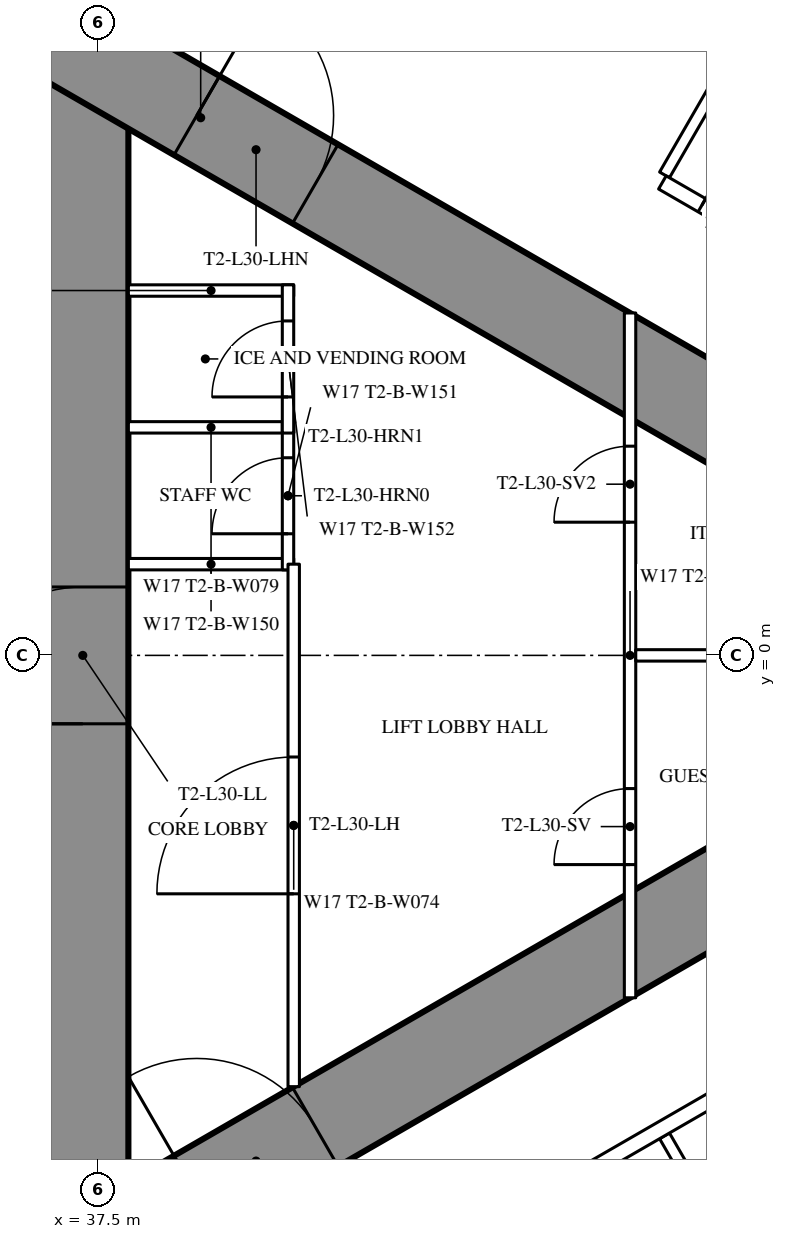
"""IFC4 building model, lengths in metres.
Left out: names, types, materials, properties, quantities, classifications, styles, units other than length and angle.
Written with IfcOpenShell. Run it as: python <this file> out.ifc"""

import sys

from ifc_helpers import new_model, si_unit, direction, frame, frame_2d, origin, place, context, subcontext, project, spatial, rectangle, extrude, element, fill, save


model = new_model("IFC4")
c1 = context("Model", 3, precision=1e-05, world=origin(), true_north=direction((0.0, 1.0)))
c2 = subcontext(c1, "Body", "Model", "MODEL_VIEW")
j1 = project(units=[si_unit("LENGTHUNIT", "METRE"), si_unit("PLANEANGLEUNIT", "RADIAN")], contexts=[c1])
p1 = place(None, origin())
s1 = spatial("IfcSite", under=j1, at=p1, CompositionType="ELEMENT")
p2 = place(p1, origin())
s2 = spatial("IfcBuilding", under=s1, at=p2, CompositionType="ELEMENT")
p3 = place(p2, frame((0.0, 0.0, 115.1)))
s3 = spatial("IfcBuildingStorey", under=s2, at=p3, CompositionType="ELEMENT", Elevation=115.1)
p4 = place(p3, frame((37.3, -8.6, 0.0), z_axis=(0.0, 0.0, 1.0), x_axis=(0.0, 1.0, 0.0)))
e1 = element("IfcWall", 1, at=p4, inside=s3, PredefinedType="SHEAR", context=c2, shape_type="SweptSolid", body=[
    extrude(rectangle(XDim=17.2, YDim=1.2, at=frame_2d((8.6, 0.0))), origin(), (0.0, 0.0, 1.0), 3.5),
])
p5 = place(p4, frame((7.7, 0.0, 0.0)))
e2 = element("IfcOpeningElement", 2, at=p5, cuts=e1, PredefinedType="OPENING", context=c2, shape_type="SweptSolid", body=[
    extrude(rectangle(XDim=1.8, YDim=2.2, at=frame_2d((0.9, 1.1))), frame((0.0, 0.61, 0.0), z_axis=(0.0, -1.0, 0.0), x_axis=(1.0, 0.0, 0.0)), (0.0, 0.0, 1.0), 1.22),
])
p6 = place(p3, frame((27.2, -13.8, 0.0), z_axis=(0.0, 0.0, 1.0), x_axis=(0.866027159892, 0.499996958321, 0.0)))
e3 = element("IfcWall", 3, at=p6, inside=s3, PredefinedType="SHEAR", context=c2, shape_type="SweptSolid", body=[
    extrude(rectangle(XDim=27.947, YDim=1.2, at=frame_2d((13.973, 0.0))), origin(), (0.0, 0.0, 1.0), 3.5),
])
p7 = place(p6, frame((4.6, 0.0, 0.0)))
e4 = element("IfcOpeningElement", 4, at=p7, cuts=e3, PredefinedType="OPENING", context=c2, shape_type="SweptSolid", body=[
    extrude(rectangle(XDim=1.0, YDim=2.2, at=frame_2d((0.5, 1.1))), frame((0.0, 0.61, 0.0), z_axis=(0.0, -1.0, 0.0), x_axis=(1.0, 0.0, 0.0)), (0.0, 0.0, 1.0), 1.22),
])
p8 = place(p6, frame((13.395, 0.0, 0.0)))
e5 = element("IfcOpeningElement", 5, at=p8, cuts=e3, PredefinedType="OPENING", context=c2, shape_type="SweptSolid", body=[
    extrude(rectangle(XDim=1.8, YDim=2.2, at=frame_2d((0.9, 1.1))), frame((0.0, 0.61, 0.0), z_axis=(0.0, -1.0, 0.0), x_axis=(1.0, 0.0, 0.0)), (0.0, 0.0, 1.0), 1.22),
])
p9 = place(p3, frame((27.2, 13.8, 0.0), z_axis=(0.0, 0.0, 1.0), x_axis=(0.866024515034, -0.500001539357, 0.0)))
e6 = element("IfcWall", 6, at=p9, inside=s3, PredefinedType="SHEAR", context=c2, shape_type="SweptSolid", body=[
    extrude(rectangle(XDim=26.907, YDim=1.2, at=frame_2d((13.454, 0.0))), origin(), (0.0, 0.0, 1.0), 3.5),
])
p10 = place(p9, frame((4.6, 0.0, 0.0)))
e7 = element("IfcOpeningElement", 7, at=p10, cuts=e6, PredefinedType="OPENING", context=c2, shape_type="SweptSolid", body=[
    extrude(rectangle(XDim=1.0, YDim=2.2, at=frame_2d((0.5, 1.1))), frame((0.0, 0.61, 0.0), z_axis=(0.0, -1.0, 0.0), x_axis=(1.0, 0.0, 0.0)), (0.0, 0.0, 1.0), 1.22),
])
p11 = place(p9, frame((13.395, 0.0, 0.0)))
e8 = element("IfcOpeningElement", 8, at=p11, cuts=e6, PredefinedType="OPENING", context=c2, shape_type="SweptSolid", body=[
    extrude(rectangle(XDim=1.8, YDim=2.2, at=frame_2d((0.9, 1.1))), frame((0.0, 0.61, 0.0), z_axis=(0.0, -1.0, 0.0), x_axis=(1.0, 0.0, 0.0)), (0.0, 0.0, 1.0), 1.22),
])
p12 = place(p3, frame((44.954, -6.321, 0.0), z_axis=(0.0, 0.0, 1.0), x_axis=(0.500018676722, -0.866014620505, 0.0)))
e9 = element("IfcWall", 9, at=p12, inside=s3, PredefinedType="PARTITIONING", context=c2, shape_type="SweptSolid", body=[
    extrude(rectangle(XDim=8.704, YDim=0.15, at=frame_2d((4.352, 0.0))), origin(), (0.0, 0.0, 1.0), 2.2),
])
p13 = place(p3, frame((44.954, 6.321, 0.0), z_axis=(0.0, 0.0, 1.0), x_axis=(0.500009815811, 0.866019736549, 0.0)))
e10 = element("IfcWall", 10, at=p13, inside=s3, PredefinedType="PARTITIONING", context=c2, shape_type="SweptSolid", body=[
    extrude(rectangle(XDim=11.424, YDim=0.15, at=frame_2d((5.712, 0.0))), origin(), (0.0, 0.0, 1.0), 3.25),
])
p14 = place(p3, frame((37.96, -10.243, 0.0), z_axis=(0.0, 0.0, 1.0), x_axis=(0.866026429433, 0.499998223521, 0.0)))
e11 = element("IfcWall", 11, at=p14, inside=s3, PredefinedType="PARTITIONING", context=c2, shape_type="SweptSolid", body=[
    extrude(rectangle(XDim=20.487, YDim=0.2, at=frame_2d((10.243, 0.0))), origin(), (0.0, 0.0, 1.0), 3.25),
])
p15 = place(p14, frame((4.343, 0.0, 0.0)))
e12 = element("IfcOpeningElement", 12, at=p15, cuts=e11, PredefinedType="OPENING", context=c2, shape_type="SweptSolid", body=[
    extrude(rectangle(XDim=0.95, YDim=2.2, at=frame_2d((0.475, 1.1))), frame((0.0, 0.11, 0.0), z_axis=(0.0, -1.0, 0.0), x_axis=(1.0, 0.0, 0.0)), (0.0, 0.0, 1.0), 0.22),
])
p16 = place(p14, frame((15.385, 0.0, 0.0)))
e13 = element("IfcOpeningElement", 13, at=p16, cuts=e11, PredefinedType="OPENING", context=c2, shape_type="SweptSolid", body=[
    extrude(rectangle(XDim=0.95, YDim=2.2, at=frame_2d((0.475, 1.1))), frame((0.0, 0.11, 0.0), z_axis=(0.0, -1.0, 0.0), x_axis=(1.0, 0.0, 0.0)), (0.0, 0.0, 1.0), 0.22),
])
p17 = place(p14, frame((17.085, 0.0, 0.0)))
e14 = element("IfcOpeningElement", 14, at=p17, cuts=e11, PredefinedType="OPENING", context=c2, shape_type="SweptSolid", body=[
    extrude(rectangle(XDim=0.95, YDim=2.2, at=frame_2d((0.475, 1.1))), frame((0.0, 0.11, 0.0), z_axis=(0.0, -1.0, 0.0), x_axis=(1.0, 0.0, 0.0)), (0.0, 0.0, 1.0), 0.22),
])
p18 = place(p14, frame((1.048, 0.0, 0.0)))
e15 = element("IfcOpeningElement", 15, at=p18, cuts=e11, PredefinedType="OPENING", context=c2, shape_type="SweptSolid", body=[
    extrude(rectangle(XDim=1.8, YDim=2.2, at=frame_2d((0.9, 1.1))), frame((0.0, 0.11, 0.0), z_axis=(0.0, -1.0, 0.0), x_axis=(1.0, 0.0, 0.0)), (0.0, 0.0, 1.0), 0.22),
])
p19 = place(p3, frame((44.925, 6.222, 0.0), z_axis=(0.0, 0.0, 1.0), x_axis=(0.866025590081, -0.499999677325, 0.0)))
e16 = element("IfcWall", 16, at=p19, inside=s3, PredefinedType="PARTITIONING", context=c2, shape_type="SweptSolid", body=[
    extrude(rectangle(XDim=12.324, YDim=0.2, at=frame_2d((6.162, 0.0))), origin(), (0.0, 0.0, 1.0), 3.25),
])
p20 = place(p19, frame((9.042, 0.0, 0.0)))
e17 = element("IfcOpeningElement", 17, at=p20, cuts=e16, PredefinedType="OPENING", context=c2, shape_type="SweptSolid", body=[
    extrude(rectangle(XDim=0.95, YDim=2.2, at=frame_2d((0.475, 1.1))), frame((0.0, 0.11, 0.0), z_axis=(0.0, -1.0, 0.0), x_axis=(1.0, 0.0, 0.0)), (0.0, 0.0, 1.0), 0.22),
])
p21 = place(p19, frame((7.342, 0.0, 0.0)))
e18 = element("IfcOpeningElement", 18, at=p21, cuts=e16, PredefinedType="OPENING", context=c2, shape_type="SweptSolid", body=[
    extrude(rectangle(XDim=0.95, YDim=2.2, at=frame_2d((0.475, 1.1))), frame((0.0, 0.11, 0.0), z_axis=(0.0, -1.0, 0.0), x_axis=(1.0, 0.0, 0.0)), (0.0, 0.0, 1.0), 0.22),
])
p22 = place(p19, frame((0.6, 0.0, 0.0)))
e19 = element("IfcOpeningElement", 19, at=p22, cuts=e16, PredefinedType="OPENING", context=c2, shape_type="SweptSolid", body=[
    extrude(rectangle(XDim=0.95, YDim=2.2, at=frame_2d((0.475, 1.1))), frame((0.0, 0.11, 0.0), z_axis=(0.0, -1.0, 0.0), x_axis=(1.0, 0.0, 0.0)), (0.0, 0.0, 1.0), 0.22),
])
for number, where, z_axis, x_axis in (
    (20, (37.9, 1.2, 0.0), (0.0, 0.0, 1.0), (1.0, 0.0, 0.0)),
    (21, (37.9, 3.0, 0.0), (0.0, 0.0, 1.0), (1.0, 0.0, 0.0)),
    (22, (37.9, 4.8, 0.0), (0.0, 0.0, 1.0), (1.0, 0.0, 0.0)),
):
    element("IfcWall", number, at=place(p3, frame(where, z_axis=z_axis, x_axis=x_axis)), inside=s3, PredefinedType="PARTITIONING", context=c2, shape_type="SweptSolid", body=[
        extrude(rectangle(XDim=2.175, YDim=0.15, at=frame_2d((1.087, 0.0))), origin(), (0.0, 0.0, 1.0), 3.25),
    ])
p23 = place(p3, frame((40.0, 1.125, 0.0), z_axis=(0.0, 0.0, 1.0), x_axis=(0.0, 1.0, 0.0)))
e23 = element("IfcWall", 23, at=p23, inside=s3, PredefinedType="PARTITIONING", context=c2, shape_type="SweptSolid", body=[
    extrude(rectangle(XDim=1.95, YDim=0.15, at=frame_2d((0.975, 0.0))), origin(), (0.0, 0.0, 1.0), 3.25),
])
p24 = place(p23, frame((0.475, 0.0, 0.0)))
e24 = element("IfcOpeningElement", 24, at=p24, cuts=e23, PredefinedType="OPENING", context=c2, shape_type="SweptSolid", body=[
    extrude(rectangle(XDim=1.0, YDim=2.2, at=frame_2d((0.5, 1.1))), frame((0.0, 0.085, 0.0), z_axis=(0.0, -1.0, 0.0), x_axis=(1.0, 0.0, 0.0)), (0.0, 0.0, 1.0), 0.17),
])
p25 = place(p3, frame((40.0, 2.925, 0.0), z_axis=(0.0, 0.0, 1.0), x_axis=(0.0, 1.0, 0.0)))
e25 = element("IfcWall", 25, at=p25, inside=s3, PredefinedType="PARTITIONING", context=c2, shape_type="SweptSolid", body=[
    extrude(rectangle(XDim=1.95, YDim=0.15, at=frame_2d((0.975, 0.0))), origin(), (0.0, 0.0, 1.0), 3.25),
])
p26 = place(p25, frame((0.475, 0.0, 0.0)))
e26 = element("IfcOpeningElement", 26, at=p26, cuts=e25, PredefinedType="OPENING", context=c2, shape_type="SweptSolid", body=[
    extrude(rectangle(XDim=1.0, YDim=2.2, at=frame_2d((0.5, 1.1))), frame((0.0, 0.085, 0.0), z_axis=(0.0, -1.0, 0.0), x_axis=(1.0, 0.0, 0.0)), (0.0, 0.0, 1.0), 0.17),
])
p27 = place(p3, frame((40.075, -5.674, 0.0), z_axis=(0.0, 0.0, 1.0), x_axis=(0.0, 1.0, 0.0)))
e27 = element("IfcWall", 27, at=p27, inside=s3, PredefinedType="PARTITIONING", context=c2, shape_type="SweptSolid", body=[
    extrude(rectangle(XDim=6.874, YDim=0.15, at=frame_2d((3.437, 0.0))), origin(), (0.0, 0.0, 1.0), 3.25),
])
p28 = place(p27, frame((2.537, 0.0, 0.0)))
e28 = element("IfcOpeningElement", 28, at=p28, cuts=e27, PredefinedType="OPENING", context=c2, shape_type="SweptSolid", body=[
    extrude(rectangle(XDim=1.8, YDim=2.2, at=frame_2d((0.9, 1.1))), frame((0.0, 0.085, 0.0), z_axis=(0.0, -1.0, 0.0), x_axis=(1.0, 0.0, 0.0)), (0.0, 0.0, 1.0), 0.17),
])
p29 = place(p3, frame((44.5, -4.505, 0.0), z_axis=(0.0, 0.0, 1.0), x_axis=(0.0, 1.0, 0.0)))
e29 = element("IfcWall", 29, at=p29, inside=s3, PredefinedType="PARTITIONING", context=c2, shape_type="SweptSolid", body=[
    extrude(rectangle(XDim=9.009, YDim=0.15, at=frame_2d((4.505, 0.0))), origin(), (0.0, 0.0, 1.0), 2.45),
])
p30 = place(p29, frame((1.752, 0.0, 0.0)))
e30 = element("IfcOpeningElement", 30, at=p30, cuts=e29, PredefinedType="OPENING", context=c2, shape_type="SweptSolid", body=[
    extrude(rectangle(XDim=1.0, YDim=2.2, at=frame_2d((0.5, 1.1))), frame((0.0, 0.085, 0.0), z_axis=(0.0, -1.0, 0.0), x_axis=(1.0, 0.0, 0.0)), (0.0, 0.0, 1.0), 0.17),
])
p31 = place(p29, frame((6.257, 0.0, 0.0)))
e31 = element("IfcOpeningElement", 31, at=p31, cuts=e29, PredefinedType="OPENING", context=c2, shape_type="SweptSolid", body=[
    extrude(rectangle(XDim=1.0, YDim=2.2, at=frame_2d((0.5, 1.1))), frame((0.0, 0.085, 0.0), z_axis=(0.0, -1.0, 0.0), x_axis=(1.0, 0.0, 0.0)), (0.0, 0.0, 1.0), 0.17),
])
p32 = place(p3, frame((44.575, 0.0, 0.0), z_axis=(0.0, 0.0, 1.0), x_axis=(1.0, 0.0, 0.0)))
e32 = element("IfcWall", 32, at=p32, inside=s3, PredefinedType="PARTITIONING", context=c2, shape_type="SweptSolid", body=[
    extrude(rectangle(XDim=7.727, YDim=0.15, at=frame_2d((3.864, 0.0))), origin(), (0.0, 0.0, 1.0), 2.2),
])
p33 = place(p22, origin())
e33 = element("IfcDoor", 33, at=p33, inside=s3, OperationType="SINGLE_SWING_LEFT", PredefinedType="DOOR", context=c2, shape_type="SweptSolid", body=[
    extrude(rectangle(XDim=0.95, YDim=2.2, at=frame_2d((0.475, 1.1))), frame((0.0, 0.025, 0.0), z_axis=(0.0, -1.0, 0.0), x_axis=(1.0, 0.0, 0.0)), (0.0, 0.0, 1.0), 0.05),
])
fill(e19, e33)
p34 = place(p24, origin())
e34 = element("IfcDoor", 34, at=p34, inside=s3, OperationType="SINGLE_SWING_LEFT", PredefinedType="DOOR", context=c2, shape_type="SweptSolid", body=[
    extrude(rectangle(XDim=1.0, YDim=2.2, at=frame_2d((0.5, 1.1))), frame((0.0, 0.025, 0.0), z_axis=(0.0, -1.0, 0.0), x_axis=(1.0, 0.0, 0.0)), (0.0, 0.0, 1.0), 0.05),
])
fill(e24, e34)
p35 = place(p26, origin())
e35 = element("IfcDoor", 35, at=p35, inside=s3, OperationType="SINGLE_SWING_LEFT", PredefinedType="DOOR", context=c2, shape_type="SweptSolid", body=[
    extrude(rectangle(XDim=1.0, YDim=2.2, at=frame_2d((0.5, 1.1))), frame((0.0, 0.025, 0.0), z_axis=(0.0, -1.0, 0.0), x_axis=(1.0, 0.0, 0.0)), (0.0, 0.0, 1.0), 0.05),
])
fill(e26, e35)
p36 = place(p28, origin())
e36 = element("IfcDoor", 36, at=p36, inside=s3, OperationType="DOUBLE_DOOR_SINGLE_SWING", PredefinedType="DOOR", context=c2, shape_type="SweptSolid", body=[
    extrude(rectangle(XDim=1.8, YDim=2.2, at=frame_2d((0.9, 1.1))), frame((0.0, 0.025, 0.0), z_axis=(0.0, -1.0, 0.0), x_axis=(1.0, 0.0, 0.0)), (0.0, 0.0, 1.0), 0.05),
])
fill(e28, e36)
p37 = place(p30, origin())
e37 = element("IfcDoor", 37, at=p37, inside=s3, OperationType="SINGLE_SWING_LEFT", PredefinedType="DOOR", context=c2, shape_type="SweptSolid", body=[
    extrude(rectangle(XDim=1.0, YDim=2.2, at=frame_2d((0.5, 1.1))), frame((0.0, 0.025, 0.0), z_axis=(0.0, -1.0, 0.0), x_axis=(1.0, 0.0, 0.0)), (0.0, 0.0, 1.0), 0.05),
])
fill(e30, e37)
p38 = place(p31, origin())
e38 = element("IfcDoor", 38, at=p38, inside=s3, OperationType="SINGLE_SWING_LEFT", PredefinedType="DOOR", context=c2, shape_type="SweptSolid", body=[
    extrude(rectangle(XDim=1.0, YDim=2.2, at=frame_2d((0.5, 1.1))), frame((0.0, 0.025, 0.0), z_axis=(0.0, -1.0, 0.0), x_axis=(1.0, 0.0, 0.0)), (0.0, 0.0, 1.0), 0.05),
])
fill(e31, e38)
p39 = place(p8, origin())
e39 = element("IfcDoor", 39, at=p39, inside=s3, OperationType="DOUBLE_DOOR_SINGLE_SWING", PredefinedType="DOOR", context=c2, shape_type="SweptSolid", body=[
    extrude(rectangle(XDim=1.8, YDim=2.2, at=frame_2d((0.9, 1.1))), frame((0.0, 0.025, 0.0), z_axis=(0.0, -1.0, 0.0), x_axis=(1.0, 0.0, 0.0)), (0.0, 0.0, 1.0), 0.05),
])
fill(e5, e39)
p40 = place(p11, origin())
e40 = element("IfcDoor", 40, at=p40, inside=s3, OperationType="DOUBLE_DOOR_SINGLE_SWING", PredefinedType="DOOR", context=c2, shape_type="SweptSolid", body=[
    extrude(rectangle(XDim=1.8, YDim=2.2, at=frame_2d((0.9, 1.1))), frame((0.0, 0.025, 0.0), z_axis=(0.0, -1.0, 0.0), x_axis=(1.0, 0.0, 0.0)), (0.0, 0.0, 1.0), 0.05),
])
fill(e8, e40)
p41 = place(p5, origin())
e41 = element("IfcDoor", 41, at=p41, inside=s3, OperationType="DOUBLE_DOOR_SINGLE_SWING", PredefinedType="DOOR", context=c2, shape_type="SweptSolid", body=[
    extrude(rectangle(XDim=1.8, YDim=2.2, at=frame_2d((0.9, 1.1))), frame((0.0, 0.025, 0.0), z_axis=(0.0, -1.0, 0.0), x_axis=(1.0, 0.0, 0.0)), (0.0, 0.0, 1.0), 0.05),
])
fill(e2, e41)
save(model, sys.argv[1])
